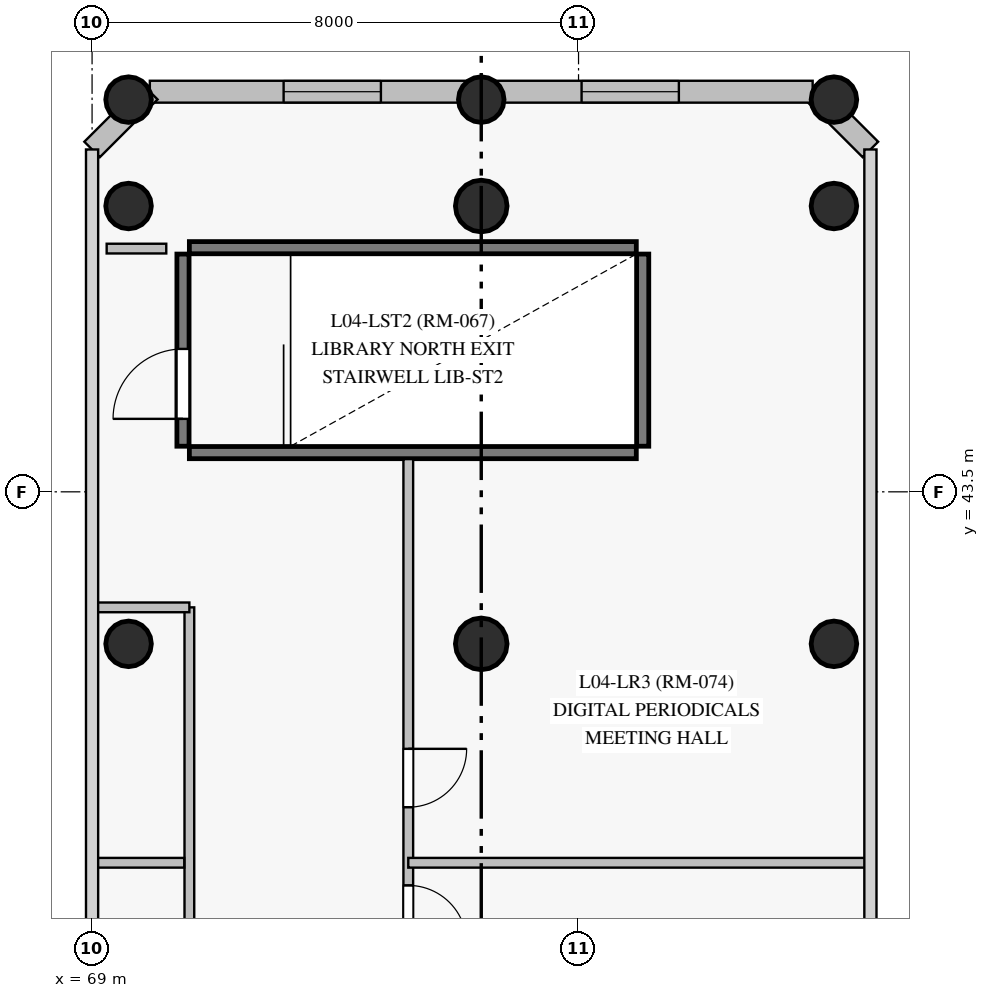
"""IFC4 building model, lengths in metres.
Left out: names, types, materials, properties, quantities, classifications, styles, units other than length and angle.
Written with IfcOpenShell. Run it as: python <this file> out.ifc"""

import sys

from ifc_helpers import new_model, si_unit, direction, frame, frame_2d, origin, origin_with_axes, origin_2d, place, context, subcontext, project, spatial, rectangle, circle, extrude, source, transform, mapped, element, fill, save


model = new_model("IFC4")
c1 = context("Model", 3, precision=1e-05, world=origin(), true_north=direction((0.0, 1.0)))
c2 = subcontext(c1, "Body", "Model", "MODEL_VIEW")
j1 = project(units=[si_unit("LENGTHUNIT", "METRE"), si_unit("PLANEANGLEUNIT", "RADIAN")], contexts=[c1])
p1 = place(None, origin())
s1 = spatial("IfcSite", under=j1, at=p1, CompositionType="ELEMENT")
p2 = place(p1, origin())
s2 = spatial("IfcBuilding", under=s1, at=p2, CompositionType="ELEMENT")
p3 = place(p2, frame((0.0, 0.0, 18.0)))
s3 = spatial("IfcBuildingStorey", under=s2, at=p3, CompositionType="ELEMENT", Elevation=18.0)
m1 = source(origin_with_axes(), c2, "Body", "SweptSolid", [
    extrude(circle(Radius=0.375, at=origin_2d()), origin(), (0.0, 0.0, 1.0), 4.225),
])
for number, where, z_axis, x_axis in (
    (1, (69.6, 49.95, 0.0), (0.0, 0.0, 1.0), (1.0, 0.0, 0.0)),
    (2, (75.4, 49.95, 0.0), (0.0, 0.0, 1.0), (1.0, 0.0, 0.0)),
    (3, (81.2, 49.95, 0.0), (0.0, 0.0, 1.0), (1.0, 0.0, 0.0)),
    (4, (69.6, 41.0, 0.0), (0.0, 0.0, 1.0), (1.0, 0.0, 0.0)),
    (5, (69.6, 48.2, 0.0), (0.0, 0.0, 1.0), (1.0, 0.0, 0.0)),
):
    element("IfcColumn", number, at=place(p3, frame(where, z_axis=z_axis, x_axis=x_axis)), inside=s3, PredefinedType="COLUMN", context=c2, shape_type="MappedRepresentation", body=[
        mapped(m1, transform((0.0, 0.0, 0.0), scale=1.0)),
    ])
m2 = source(origin_with_axes(), c2, "Body", "SweptSolid", [
    extrude(circle(Radius=0.425, at=origin_2d()), origin(), (0.0, 0.0, 1.0), 4.225),
])
for number, where, z_axis, x_axis in (
    (6, (75.4, 41.0, 0.0), (0.0, 0.0, 1.0), (1.0, 0.0, 0.0)),
    (7, (75.4, 48.2, 0.0), (0.0, 0.0, 1.0), (1.0, 0.0, 0.0)),
):
    element("IfcColumn", number, at=place(p3, frame(where, z_axis=z_axis, x_axis=x_axis)), inside=s3, PredefinedType="COLUMN", context=c2, shape_type="MappedRepresentation", body=[
        mapped(m2, transform((0.0, 0.0, 0.0), scale=1.0)),
    ])
for number, where, z_axis, x_axis in (
    (8, (81.2, 41.0, 0.0), (0.0, 0.0, 1.0), (1.0, 0.0, 0.0)),
    (9, (81.2, 48.2, 0.0), (0.0, 0.0, 1.0), (1.0, 0.0, 0.0)),
):
    element("IfcColumn", number, at=place(p3, frame(where, z_axis=z_axis, x_axis=x_axis)), inside=s3, PredefinedType="COLUMN", context=c2, shape_type="MappedRepresentation", body=[
        mapped(m1, transform((0.0, 0.0, 0.0), scale=1.0)),
    ])
p4 = place(p3, frame((81.8, 49.13, 0.0), z_axis=(0.0, 0.0, 1.0), x_axis=(-0.707015922623, 0.707197628077, 0.0)))
e10 = element("IfcWall", 10, at=p4, inside=s3, PredefinedType="SOLIDWALL", context=c2, shape_type="SweptSolid", body=[
    extrude(rectangle(XDim=1.344, YDim=0.36, at=frame_2d((0.672, 0.0))), origin(), (0.0, 0.0, 1.0), 2.825),
])
p5 = place(p3, frame((80.85, 50.08, 0.0), z_axis=(0.0, 0.0, 1.0), x_axis=(-1.0, 0.0, 0.0)))
e11 = element("IfcWall", 11, at=p5, inside=s3, PredefinedType="SOLIDWALL", context=c2, shape_type="SweptSolid", body=[
    extrude(rectangle(XDim=10.9, YDim=0.36, at=frame_2d((5.45, 0.0))), origin(), (0.0, 0.0, 1.0), 4.225),
])
p6 = place(p5, frame((2.2, 0.0, 0.85)))
e12 = element("IfcOpeningElement", 12, at=p6, cuts=e11, PredefinedType="OPENING", context=c2, shape_type="SweptSolid", body=[
    extrude(rectangle(XDim=1.6, YDim=2.2, at=frame_2d((0.8, 1.1))), frame((0.0, 0.19, 0.0), z_axis=(0.0, -1.0, 0.0), x_axis=(1.0, 0.0, 0.0)), (0.0, 0.0, 1.0), 0.38),
])
p7 = place(p5, frame((7.1, 0.0, 0.85)))
e13 = element("IfcOpeningElement", 13, at=p7, cuts=e11, PredefinedType="OPENING", context=c2, shape_type="SweptSolid", body=[
    extrude(rectangle(XDim=1.6, YDim=2.2, at=frame_2d((0.8, 1.1))), frame((0.0, 0.19, 0.0), z_axis=(0.0, -1.0, 0.0), x_axis=(1.0, 0.0, 0.0)), (0.0, 0.0, 1.0), 0.38),
])
p8 = place(p3, frame((69.95, 50.08, 0.0), z_axis=(0.0, 0.0, 1.0), x_axis=(-0.707015922623, -0.707197628077, 0.0)))
e14 = element("IfcWall", 14, at=p8, inside=s3, PredefinedType="SOLIDWALL", context=c2, shape_type="SweptSolid", body=[
    extrude(rectangle(XDim=1.344, YDim=0.36, at=frame_2d((0.672, 0.0))), origin(), (0.0, 0.0, 1.0), 2.825),
])
for number, where, z_axis, x_axis in (
    (15, (70.6, 44.145, 0.0), (0.0, 0.0, 1.0), (1.0, 0.0, 0.0)),
    (16, (70.6, 47.515, 0.0), (0.0, 0.0, 1.0), (1.0, 0.0, 0.0)),
):
    element("IfcWall", number, at=place(p3, frame(where, z_axis=z_axis, x_axis=x_axis)), inside=s3, PredefinedType="SHEAR", context=c2, shape_type="SweptSolid", body=[
        extrude(rectangle(XDim=7.35, YDim=0.2, at=frame_2d((3.675, 0.0))), origin(), (0.0, 0.0, 1.0), 4.225),
    ])
p9 = place(p3, frame((70.495, 44.25, 0.0), z_axis=(0.0, 0.0, 1.0), x_axis=(0.0, 1.0, 0.0)))
e17 = element("IfcWall", 17, at=p9, inside=s3, PredefinedType="SHEAR", context=c2, shape_type="SweptSolid", body=[
    extrude(rectangle(XDim=3.16, YDim=0.2, at=frame_2d((1.58, 0.0))), origin(), (0.0, 0.0, 1.0), 4.225),
])
p10 = place(p9, frame((0.45, 0.0, 0.0)))
e18 = element("IfcOpeningElement", 18, at=p10, cuts=e17, PredefinedType="OPENING", context=c2, shape_type="SweptSolid", body=[
    extrude(rectangle(XDim=1.15, YDim=2.15, at=frame_2d((0.575, 1.075))), frame((0.0, 0.11, 0.0), z_axis=(0.0, -1.0, 0.0), x_axis=(1.0, 0.0, 0.0)), (0.0, 0.0, 1.0), 0.22),
])
p11 = place(p3, frame((78.055, 44.25, 0.0), z_axis=(0.0, 0.0, 1.0), x_axis=(0.0, 1.0, 0.0)))
e19 = element("IfcWall", 19, at=p11, inside=s3, PredefinedType="SHEAR", context=c2, shape_type="SweptSolid", body=[
    extrude(rectangle(XDim=3.16, YDim=0.2, at=frame_2d((1.58, 0.0))), origin(), (0.0, 0.0, 1.0), 4.225),
])
p12 = place(p3, frame((70.6, 11.4, 0.0), z_axis=(0.0, 0.0, 1.0), x_axis=(0.0, 1.0, 0.0)))
e20 = element("IfcWall", 20, at=p12, inside=s3, PredefinedType="PARTITIONING", context=c2, shape_type="SweptSolid", body=[
    extrude(rectangle(XDim=30.2, YDim=0.16, at=frame_2d((15.1, 0.0))), origin(), (0.0, 0.0, 1.0), 4.225),
])
p13 = place(p3, frame((74.2, 44.038, 0.0), z_axis=(0.0, 0.0, 1.0), x_axis=(0.0, -1.0, 0.0)))
e21 = element("IfcWall", 21, at=p13, inside=s3, PredefinedType="PARTITIONING", context=c2, shape_type="SweptSolid", body=[
    extrude(rectangle(XDim=15.138, YDim=0.16, at=frame_2d((7.569, 0.0))), origin(), (0.0, 0.0, 1.0), 4.225),
])
p14 = place(p13, frame((7.01, 0.0, 0.0)))
e22 = element("IfcOpeningElement", 22, at=p14, cuts=e21, PredefinedType="OPENING", context=c2, shape_type="SweptSolid", body=[
    extrude(rectangle(XDim=0.96, YDim=2.15, at=frame_2d((0.48, 1.075))), frame((0.0, 0.09, 0.0), z_axis=(0.0, -1.0, 0.0), x_axis=(1.0, 0.0, 0.0)), (0.0, 0.0, 1.0), 0.18),
])
p15 = place(p13, frame((4.764, 0.0, 0.0)))
e23 = element("IfcOpeningElement", 23, at=p15, cuts=e21, PredefinedType="OPENING", context=c2, shape_type="SweptSolid", body=[
    extrude(rectangle(XDim=0.96, YDim=2.15, at=frame_2d((0.48, 1.075))), frame((0.0, 0.09, 0.0), z_axis=(0.0, -1.0, 0.0), x_axis=(1.0, 0.0, 0.0)), (0.0, 0.0, 1.0), 0.18),
])
p16 = place(p3, frame((74.2, 37.4, 0.0), z_axis=(0.0, 0.0, 1.0), x_axis=(1.0, 0.0, 0.0)))
e24 = element("IfcWall", 24, at=p16, inside=s3, PredefinedType="PARTITIONING", context=c2, shape_type="SweptSolid", body=[
    extrude(rectangle(XDim=7.545, YDim=0.16, at=frame_2d((3.772, 0.0))), origin(), (0.0, 0.0, 1.0), 4.225),
])
p17 = place(p3, frame((69.055, 37.4, 0.0), z_axis=(0.0, 0.0, 1.0), x_axis=(1.0, 0.0, 0.0)))
e25 = element("IfcWall", 25, at=p17, inside=s3, PredefinedType="PARTITIONING", context=c2, shape_type="SweptSolid", body=[
    extrude(rectangle(XDim=1.461, YDim=0.16, at=frame_2d((0.73, 0.0))), origin(), (0.0, 0.0, 1.0), 4.225),
])
p18 = place(p3, frame((70.6, 41.6, 0.0), z_axis=(0.0, 0.0, 1.0), x_axis=(-1.0, 0.0, 0.0)))
e26 = element("IfcWall", 26, at=p18, inside=s3, PredefinedType="PARTITIONING", context=c2, shape_type="SweptSolid", body=[
    extrude(rectangle(XDim=1.515, YDim=0.16, at=frame_2d((0.758, 0.0))), origin(), (0.0, 0.0, 1.0), 4.225),
])
p19 = place(p3, frame((69.24, 47.5, 0.0), z_axis=(0.0, 0.0, 1.0), x_axis=(1.0, 0.0, 0.0)))
e27 = element("IfcWall", 27, at=p19, inside=s3, PredefinedType="PARTITIONING", context=c2, shape_type="SweptSolid", body=[
    extrude(rectangle(XDim=0.98, YDim=0.16, at=frame_2d((0.49, 0.0))), origin(), (0.0, 0.0, 1.0), 4.225),
])
m3 = source(origin_with_axes(), c2, "Body", "SweptSolid", [
    extrude(rectangle(XDim=1.6, YDim=2.2, at=frame_2d((0.8, 1.1))), frame((0.0, 0.03, 0.0), z_axis=(0.0, -1.0, 0.0), x_axis=(1.0, 0.0, 0.0)), (0.0, 0.0, 1.0), 0.06),
])
p20 = place(p6, origin())
e28 = element("IfcWindow", 28, at=p20, inside=s3, PartitioningType="SINGLE_PANEL", PredefinedType="WINDOW", context=c2, shape_type="MappedRepresentation", body=[
    mapped(m3, transform((0.0, 0.0, 0.0), scale=1.0)),
])
fill(e12, e28)
p21 = place(p7, origin())
e29 = element("IfcWindow", 29, at=p21, inside=s3, PartitioningType="SINGLE_PANEL", PredefinedType="WINDOW", context=c2, shape_type="MappedRepresentation", body=[
    mapped(m3, transform((0.0, 0.0, 0.0), scale=1.0)),
])
fill(e13, e29)
m4 = source(origin_with_axes(), c2, "Body", "SweptSolid", [
    extrude(rectangle(XDim=1.15, YDim=2.15, at=frame_2d((0.575, 1.075))), frame((0.0, 0.025, 0.0), z_axis=(0.0, -1.0, 0.0), x_axis=(1.0, 0.0, 0.0)), (0.0, 0.0, 1.0), 0.05),
])
p22 = place(p10, origin())
e30 = element("IfcDoor", 30, at=p22, inside=s3, OperationType="SINGLE_SWING_LEFT", PredefinedType="DOOR", context=c2, shape_type="MappedRepresentation", body=[
    mapped(m4, transform((0.0, 0.0, 0.0), scale=1.0)),
])
fill(e18, e30)
m5 = source(origin_with_axes(), c2, "Body", "SweptSolid", [
    extrude(rectangle(XDim=0.96, YDim=2.15, at=frame_2d((0.48, 1.075))), frame((0.0, 0.025, 0.0), z_axis=(0.0, -1.0, 0.0), x_axis=(1.0, 0.0, 0.0)), (0.0, 0.0, 1.0), 0.05),
])
p23 = place(p14, origin())
e31 = element("IfcDoor", 31, at=p23, inside=s3, OperationType="SINGLE_SWING_RIGHT", PredefinedType="DOOR", context=c2, shape_type="MappedRepresentation", body=[
    mapped(m5, transform((0.0, 0.0, 0.0), scale=1.0)),
])
fill(e22, e31)
p24 = place(p15, origin())
e32 = element("IfcDoor", 32, at=p24, inside=s3, OperationType="SINGLE_SWING_LEFT", PredefinedType="DOOR", context=c2, shape_type="MappedRepresentation", body=[
    mapped(m5, transform((0.0, 0.0, 0.0), scale=1.0)),
])
fill(e23, e32)
save(model, sys.argv[1])
